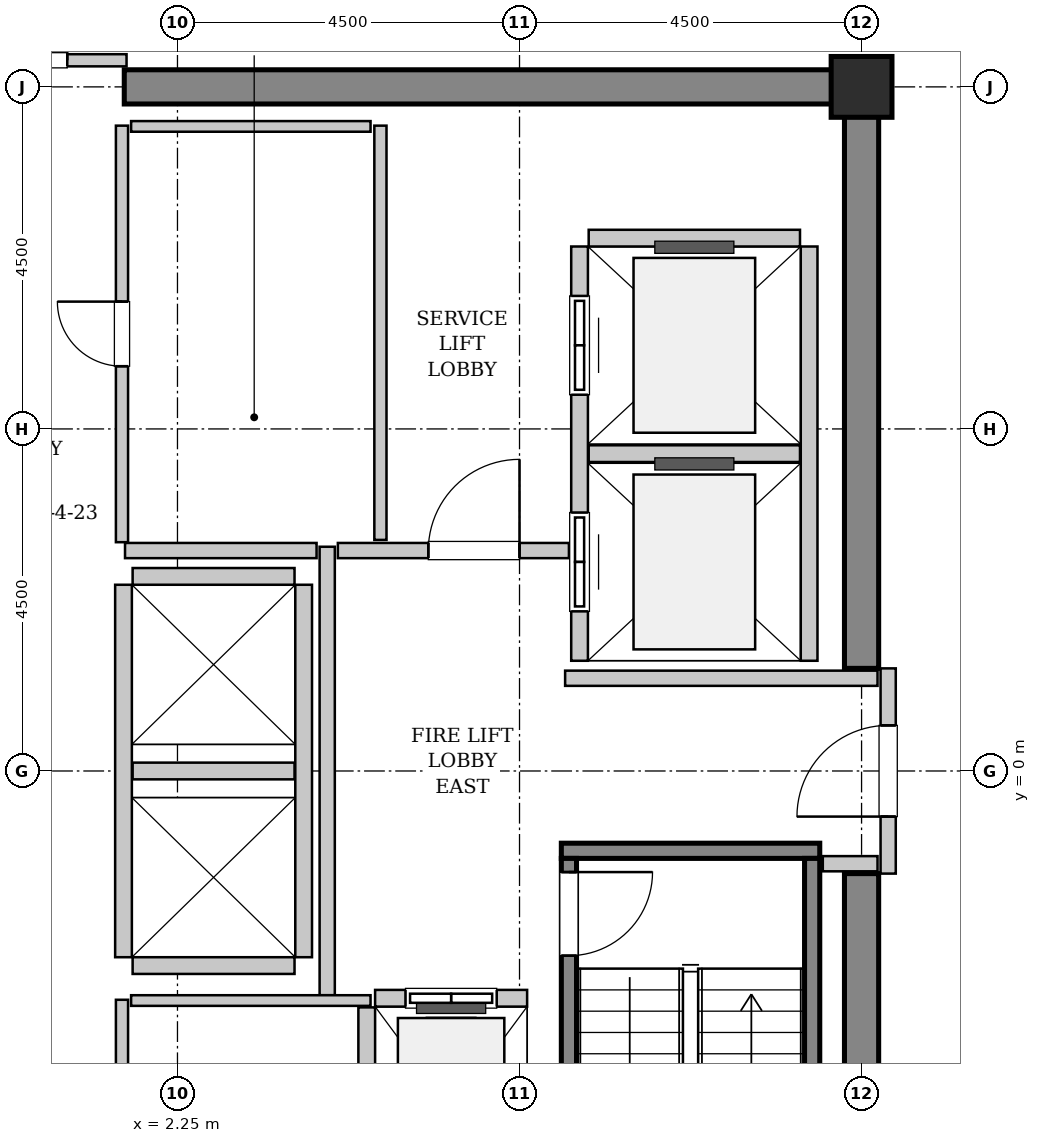
"""IFC4 building model, lengths in metres.
Left out: names, types, materials, properties, quantities, classifications, styles, units other than length and angle.
Written with IfcOpenShell. Run it as: python <this file> out.ifc"""

import sys

from ifc_helpers import new_model, si_unit, direction, frame, frame_2d, origin, origin_2d, place, context, subcontext, project, spatial, rectangle, hollow_rectangle, extrude, source, transform, mapped, element, fill, save


model = new_model("IFC4")
c1 = context("Model", 3, precision=1e-05, world=origin(), true_north=direction((0.0, 1.0)))
c2 = subcontext(c1, "Body", "Model", "MODEL_VIEW")
j1 = project(units=[si_unit("LENGTHUNIT", "METRE"), si_unit("PLANEANGLEUNIT", "RADIAN")], contexts=[c1])
p1 = place(None, origin())
s1 = spatial("IfcSite", under=j1, at=p1, CompositionType="ELEMENT")
p2 = place(p1, origin())
s2 = spatial("IfcBuilding", under=s1, at=p2, CompositionType="ELEMENT")
p3 = place(p2, frame((0.0, 0.0, 272.2)))
s3 = spatial("IfcBuildingStorey", under=s2, at=p3, CompositionType="ELEMENT", Elevation=272.2)
m1 = source(origin(), c2, "Body", "SweptSolid", [
    extrude(rectangle(XDim=9.925, YDim=0.45, at=frame_2d((4.962, 0.0))), origin(), (0.0, 0.0, 1.0), 3.8),
])
p4 = place(p3, frame((1.55, 9.0, 0.0), z_axis=(0.0, 0.0, 1.0), x_axis=(1.0, 0.0, 0.0)))
e1 = element("IfcWall", 1, at=p4, inside=s3, PredefinedType="SHEAR", context=c2, shape_type="MappedRepresentation", body=[
    mapped(m1, transform((0.0, 0.0, 0.0), x_axis=(1.0, 0.0, 0.0), y_axis=(0.0, 1.0, 0.0), z_axis=(0.0, 0.0, 1.0), scale=1.0)),
])
m2 = source(origin(), c2, "Body", "SweptSolid", [
    extrude(rectangle(XDim=7.425, YDim=0.45, at=frame_2d((3.712, 0.0))), origin(), (0.0, 0.0, 1.0), 3.8),
])
for number, where, z_axis, x_axis in (
    (2, (11.25, -8.775, 0.0), (0.0, 0.0, 1.0), (0.0, 1.0, 0.0)),
    (3, (11.25, 1.35, 0.0), (0.0, 0.0, 1.0), (0.0, 1.0, 0.0)),
):
    element("IfcWall", number, at=place(p3, frame(where, z_axis=z_axis, x_axis=x_axis)), inside=s3, PredefinedType="SHEAR", context=c2, shape_type="MappedRepresentation", body=[
        mapped(m2, transform((0.0, 0.0, 0.0), x_axis=(1.0, 0.0, 0.0), y_axis=(0.0, 1.0, 0.0), z_axis=(0.0, 0.0, 1.0), scale=1.0)),
    ])
m3 = source(origin(), c2, "Body", "SweptSolid", [
    extrude(hollow_rectangle(XDim=0.8, YDim=0.8, WallThickness=0.04, InnerFilletRadius=0.04, OuterFilletRadius=0.08, at=origin_2d()), origin(), (0.0, 0.0, 1.0), 3.8),
])
p5 = place(p3, frame((11.25, 9.0, 0.0), z_axis=(0.0, 0.0, 1.0), x_axis=(1.0, 0.0, 0.0)))
e4 = element("IfcColumn", 4, at=p5, inside=s3, PredefinedType="COLUMN", context=c2, shape_type="MappedRepresentation", body=[
    mapped(m3, transform((0.0, 0.0, 0.0), x_axis=(1.0, 0.0, 0.0), y_axis=(0.0, 1.0, 0.0), z_axis=(0.0, 0.0, 1.0), scale=1.0)),
])
m4 = source(origin(), c2, "Body", "SweptSolid", [
    extrude(rectangle(XDim=3.4, YDim=0.2, at=frame_2d((1.7, 0.0))), origin(), (0.0, 0.0, 1.0), 3.8),
])
p6 = place(p3, frame((7.3, -1.05, 0.0), z_axis=(0.0, 0.0, 1.0), x_axis=(1.0, 0.0, 0.0)))
e5 = element("IfcWall", 5, at=p6, inside=s3, PredefinedType="SOLIDWALL", context=c2, shape_type="MappedRepresentation", body=[
    mapped(m4, transform((0.0, 0.0, 0.0), x_axis=(1.0, 0.0, 0.0), y_axis=(0.0, 1.0, 0.0), z_axis=(0.0, 0.0, 1.0), scale=1.0)),
])
m5 = source(origin(), c2, "Body", "SweptSolid", [
    extrude(rectangle(XDim=7.1, YDim=0.2, at=frame_2d((3.55, 0.0))), origin(), (0.0, 0.0, 1.0), 3.8),
])
p7 = place(p3, frame((7.4, -1.15, 0.0), z_axis=(0.0, 0.0, 1.0), x_axis=(0.0, -1.0, 0.0)))
e6 = element("IfcWall", 6, at=p7, inside=s3, PredefinedType="SOLIDWALL", context=c2, shape_type="MappedRepresentation", body=[
    mapped(m5, transform((0.0, 0.0, 0.0), x_axis=(1.0, 0.0, 0.0), y_axis=(0.0, 1.0, 0.0), z_axis=(0.0, 0.0, 1.0), scale=1.0)),
])
p8 = place(p7, frame((0.18, 0.0, 0.0)))
e7 = element("IfcOpeningElement", 7, at=p8, cuts=e6, PredefinedType="OPENING", context=c2, shape_type="SweptSolid", body=[
    extrude(rectangle(XDim=1.1, YDim=2.15, at=frame_2d((0.55, 1.075))), frame((0.0, 0.11, 0.0), z_axis=(0.0, -1.0, 0.0), x_axis=(1.0, 0.0, 0.0)), (0.0, 0.0, 1.0), 0.22),
])
p9 = place(p3, frame((10.6, -1.15, 0.0), z_axis=(0.0, 0.0, 1.0), x_axis=(0.0, -1.0, 0.0)))
e8 = element("IfcWall", 8, at=p9, inside=s3, PredefinedType="SOLIDWALL", context=c2, shape_type="MappedRepresentation", body=[
    mapped(m5, transform((0.0, 0.0, 0.0), x_axis=(1.0, 0.0, 0.0), y_axis=(0.0, 1.0, 0.0), z_axis=(0.0, 0.0, 1.0), scale=1.0)),
])
m6 = source(origin(), c2, "Body", "SweptSolid", [
    extrude(rectangle(XDim=2.0, YDim=0.22, at=frame_2d((1.0, 0.0))), origin(), (0.0, 0.0, 1.0), 3.535),
])
p10 = place(p3, frame((6.85, -2.99, 0.0), z_axis=(0.0, 0.0, 1.0), x_axis=(-1.0, 0.0, 0.0)))
e9 = element("IfcWall", 9, at=p10, inside=s3, PredefinedType="SOLIDWALL", context=c2, shape_type="MappedRepresentation", body=[
    mapped(m6, transform((0.0, 0.0, 0.0), x_axis=(1.0, 0.0, 0.0), y_axis=(0.0, 1.0, 0.0), z_axis=(0.0, 0.0, 1.0), scale=1.0)),
])
p11 = place(p10, frame((0.4, 0.0, 0.0)))
e10 = element("IfcOpeningElement", 10, at=p11, cuts=e9, PredefinedType="OPENING", context=c2, shape_type="SweptSolid", body=[
    extrude(rectangle(XDim=1.2, YDim=2.2, at=frame_2d((0.6, 1.1))), frame((0.0, 0.12, 0.0), z_axis=(0.0, -1.0, 0.0), x_axis=(1.0, 0.0, 0.0)), (0.0, 0.0, 1.0), 0.24),
])
m7 = source(origin(), c2, "Body", "SweptSolid", [
    extrude(rectangle(XDim=2.68, YDim=0.22, at=frame_2d((1.34, 0.0))), origin(), (0.0, 0.0, 1.0), 3.535),
])
p12 = place(p3, frame((4.74, -3.11, 0.0), z_axis=(0.0, 0.0, 1.0), x_axis=(0.0, -1.0, 0.0)))
e11 = element("IfcWall", 11, at=p12, inside=s3, PredefinedType="SOLIDWALL", context=c2, shape_type="MappedRepresentation", body=[
    mapped(m7, transform((0.0, 0.0, 0.0), x_axis=(1.0, 0.0, 0.0), y_axis=(0.0, 1.0, 0.0), z_axis=(0.0, 0.0, 1.0), scale=1.0)),
])
m8 = source(origin(), c2, "Body", "SweptSolid", [
    extrude(rectangle(XDim=5.45, YDim=0.22, at=frame_2d((2.725, 0.0))), origin(), (0.0, 0.0, 1.0), 3.535),
])
p13 = place(p3, frame((7.54, 6.9, 0.0), z_axis=(0.0, 0.0, 1.0), x_axis=(0.0, -1.0, 0.0)))
e12 = element("IfcWall", 12, at=p13, inside=s3, PredefinedType="SOLIDWALL", context=c2, shape_type="MappedRepresentation", body=[
    mapped(m8, transform((0.0, 0.0, 0.0), x_axis=(1.0, 0.0, 0.0), y_axis=(0.0, 1.0, 0.0), z_axis=(0.0, 0.0, 1.0), scale=1.0)),
])
p14 = place(p13, frame((3.5, 0.0, 0.0)))
e13 = element("IfcOpeningElement", 13, at=p14, cuts=e12, PredefinedType="OPENING", context=c2, shape_type="SweptSolid", body=[
    extrude(rectangle(XDim=1.3, YDim=2.3, at=frame_2d((0.65, 1.15))), frame((0.0, 0.12, 0.0), z_axis=(0.0, -1.0, 0.0), x_axis=(1.0, 0.0, 0.0)), (0.0, 0.0, 1.0), 0.24),
])
p15 = place(p13, frame((0.65, 0.0, 0.0)))
e14 = element("IfcOpeningElement", 14, at=p15, cuts=e12, PredefinedType="OPENING", context=c2, shape_type="SweptSolid", body=[
    extrude(rectangle(XDim=1.3, YDim=2.3, at=frame_2d((0.65, 1.15))), frame((0.0, 0.12, 0.0), z_axis=(0.0, -1.0, 0.0), x_axis=(1.0, 0.0, 0.0)), (0.0, 0.0, 1.0), 0.24),
])
p16 = place(p3, frame((10.56, 1.45, 0.0), z_axis=(0.0, 0.0, 1.0), x_axis=(0.0, 1.0, 0.0)))
e15 = element("IfcWall", 15, at=p16, inside=s3, PredefinedType="SOLIDWALL", context=c2, shape_type="MappedRepresentation", body=[
    mapped(m8, transform((0.0, 0.0, 0.0), x_axis=(1.0, 0.0, 0.0), y_axis=(0.0, 1.0, 0.0), z_axis=(0.0, 0.0, 1.0), scale=1.0)),
])
m9 = source(origin(), c2, "Body", "SweptSolid", [
    extrude(rectangle(XDim=2.78, YDim=0.22, at=frame_2d((1.39, 0.0))), origin(), (0.0, 0.0, 1.0), 3.535),
])
for number, where, z_axis, x_axis in (
    (16, (7.66, 4.175, 0.0), (0.0, 0.0, 1.0), (1.0, 0.0, 0.0)),
    (17, (10.44, 7.01, 0.0), (0.0, 0.0, 1.0), (-1.0, 0.0, 0.0)),
):
    element("IfcWall", number, at=place(p3, frame(where, z_axis=z_axis, x_axis=x_axis)), inside=s3, PredefinedType="SOLIDWALL", context=c2, shape_type="MappedRepresentation", body=[
        mapped(m9, transform((0.0, 0.0, 0.0), x_axis=(1.0, 0.0, 0.0), y_axis=(0.0, 1.0, 0.0), z_axis=(0.0, 0.0, 1.0), scale=1.0)),
    ])
m10 = source(origin(), c2, "Body", "SweptSolid", [
    extrude(rectangle(XDim=4.9, YDim=0.22, at=frame_2d((2.45, 0.0))), origin(), (0.0, 0.0, 1.0), 3.535),
])
for number, where, z_axis, x_axis in (
    (18, (1.54, 2.45, 0.0), (0.0, 0.0, 1.0), (0.0, -1.0, 0.0)),
    (19, (3.91, -2.45, 0.0), (0.0, 0.0, 1.0), (0.0, 1.0, 0.0)),
):
    element("IfcWall", number, at=place(p3, frame(where, z_axis=z_axis, x_axis=x_axis)), inside=s3, PredefinedType="SOLIDWALL", context=c2, shape_type="MappedRepresentation", body=[
        mapped(m10, transform((0.0, 0.0, 0.0), x_axis=(1.0, 0.0, 0.0), y_axis=(0.0, 1.0, 0.0), z_axis=(0.0, 0.0, 1.0), scale=1.0)),
    ])
m11 = source(origin(), c2, "Body", "SweptSolid", [
    extrude(rectangle(XDim=2.13, YDim=0.22, at=frame_2d((1.065, 0.0))), origin(), (0.0, 0.0, 1.0), 3.535),
])
for number, where, z_axis, x_axis in (
    (20, (1.66, -2.56, 0.0), (0.0, 0.0, 1.0), (1.0, 0.0, 0.0)),
    (21, (1.66, 0.0, 0.0), (0.0, 0.0, 1.0), (1.0, 0.0, 0.0)),
    (22, (3.79, 2.56, 0.0), (0.0, 0.0, 1.0), (-1.0, 0.0, 0.0)),
):
    element("IfcWall", number, at=place(p3, frame(where, z_axis=z_axis, x_axis=x_axis)), inside=s3, PredefinedType="SOLIDWALL", context=c2, shape_type="MappedRepresentation", body=[
        mapped(m11, transform((0.0, 0.0, 0.0), x_axis=(1.0, 0.0, 0.0), y_axis=(0.0, 1.0, 0.0), z_axis=(0.0, 0.0, 1.0), scale=1.0)),
    ])
m12 = source(origin(), c2, "Body", "SweptSolid", [
    extrude(rectangle(XDim=2.7, YDim=0.2, at=frame_2d((1.35, 0.0))), origin(), (0.0, 0.0, 1.0), 2.625),
])
p17 = place(p3, frame((11.6, -1.35, 0.0), z_axis=(0.0, 0.0, 1.0), x_axis=(0.0, 1.0, 0.0)))
e23 = element("IfcWall", 23, at=p17, inside=s3, PredefinedType="PARTITIONING", context=c2, shape_type="MappedRepresentation", body=[
    mapped(m12, transform((0.0, 0.0, 0.0), x_axis=(1.0, 0.0, 0.0), y_axis=(0.0, 1.0, 0.0), z_axis=(0.0, 0.0, 1.0), scale=1.0)),
])
p18 = place(p17, frame((0.75, 0.0, 0.0)))
e24 = element("IfcOpeningElement", 24, at=p18, cuts=e23, PredefinedType="OPENING", context=c2, shape_type="SweptSolid", body=[
    extrude(rectangle(XDim=1.2, YDim=2.15, at=frame_2d((0.6, 1.075))), frame((0.0, 0.11, 0.0), z_axis=(0.0, -1.0, 0.0), x_axis=(1.0, 0.0, 0.0)), (0.0, 0.0, 1.0), 0.22),
])
m13 = source(origin(), c2, "Body", "SweptSolid", [
    extrude(rectangle(XDim=5.9, YDim=0.2, at=frame_2d((2.95, 0.0))), origin(), (0.0, 0.0, 1.0), 3.535),
])
p19 = place(p3, frame((4.22, -2.95, 0.0), z_axis=(0.0, 0.0, 1.0), x_axis=(0.0, 1.0, 0.0)))
e25 = element("IfcWall", 25, at=p19, inside=s3, PredefinedType="PARTITIONING", context=c2, shape_type="MappedRepresentation", body=[
    mapped(m13, transform((0.0, 0.0, 0.0), x_axis=(1.0, 0.0, 0.0), y_axis=(0.0, 1.0, 0.0), z_axis=(0.0, 0.0, 1.0), scale=1.0)),
])
m14 = source(origin(), c2, "Body", "SweptSolid", [
    extrude(rectangle(XDim=2.52, YDim=0.2, at=frame_2d((1.26, 0.0))), origin(), (0.0, 0.0, 1.0), 3.535),
])
p20 = place(p3, frame((1.56, 2.9, 0.0), z_axis=(0.0, 0.0, 1.0), x_axis=(1.0, 0.0, 0.0)))
e26 = element("IfcWall", 26, at=p20, inside=s3, PredefinedType="PARTITIONING", context=c2, shape_type="MappedRepresentation", body=[
    mapped(m14, transform((0.0, 0.0, 0.0), x_axis=(1.0, 0.0, 0.0), y_axis=(0.0, 1.0, 0.0), z_axis=(0.0, 0.0, 1.0), scale=1.0)),
])
m15 = source(origin(), c2, "Body", "SweptSolid", [
    extrude(rectangle(XDim=3.04, YDim=0.2, at=frame_2d((1.52, 0.0))), origin(), (0.0, 0.0, 1.0), 3.535),
])
p21 = place(p3, frame((4.36, 2.9, 0.0), z_axis=(0.0, 0.0, 1.0), x_axis=(1.0, 0.0, 0.0)))
e27 = element("IfcWall", 27, at=p21, inside=s3, PredefinedType="PARTITIONING", context=c2, shape_type="MappedRepresentation", body=[
    mapped(m15, transform((0.0, 0.0, 0.0), x_axis=(1.0, 0.0, 0.0), y_axis=(0.0, 1.0, 0.0), z_axis=(0.0, 0.0, 1.0), scale=1.0)),
])
p22 = place(p21, frame((1.19, 0.0, 0.0)))
e28 = element("IfcOpeningElement", 28, at=p22, cuts=e27, PredefinedType="OPENING", context=c2, shape_type="SweptSolid", body=[
    extrude(rectangle(XDim=1.2, YDim=2.15, at=frame_2d((0.6, 1.075))), frame((0.0, 0.11, 0.0), z_axis=(0.0, -1.0, 0.0), x_axis=(1.0, 0.0, 0.0)), (0.0, 0.0, 1.0), 0.22),
])
m16 = source(origin(), c2, "Body", "SweptSolid", [
    extrude(rectangle(XDim=4.11, YDim=0.2, at=frame_2d((2.055, 0.0))), origin(), (0.0, 0.0, 1.0), 3.535),
])
p23 = place(p3, frame((7.35, 1.22, 0.0), z_axis=(0.0, 0.0, 1.0), x_axis=(1.0, 0.0, 0.0)))
e29 = element("IfcWall", 29, at=p23, inside=s3, PredefinedType="PARTITIONING", context=c2, shape_type="MappedRepresentation", body=[
    mapped(m16, transform((0.0, 0.0, 0.0), x_axis=(1.0, 0.0, 0.0), y_axis=(0.0, 1.0, 0.0), z_axis=(0.0, 0.0, 1.0), scale=1.0)),
])
m17 = source(origin(), c2, "Body", "SweptSolid", [
    extrude(rectangle(XDim=0.72, YDim=0.2, at=frame_2d((0.36, 0.0))), origin(), (0.0, 0.0, 1.0), 3.535),
])
p24 = place(p3, frame((10.74, -1.22, 0.0), z_axis=(0.0, 0.0, 1.0), x_axis=(1.0, 0.0, 0.0)))
e30 = element("IfcWall", 30, at=p24, inside=s3, PredefinedType="PARTITIONING", context=c2, shape_type="MappedRepresentation", body=[
    mapped(m17, transform((0.0, 0.0, 0.0), x_axis=(1.0, 0.0, 0.0), y_axis=(0.0, 1.0, 0.0), z_axis=(0.0, 0.0, 1.0), scale=1.0)),
])
m18 = source(origin(), c2, "Body", "SweptSolid", [
    extrude(rectangle(XDim=3.16, YDim=0.16, at=frame_2d((1.58, 0.0))), origin(), (0.0, 0.0, 1.0), 2.625),
])
p25 = place(p3, frame((-1.58, 9.35, 0.0), z_axis=(0.0, 0.0, 1.0), x_axis=(1.0, 0.0, 0.0)))
e31 = element("IfcWall", 31, at=p25, inside=s3, PredefinedType="PARTITIONING", context=c2, shape_type="MappedRepresentation", body=[
    mapped(m18, transform((0.0, 0.0, 0.0), x_axis=(1.0, 0.0, 0.0), y_axis=(0.0, 1.0, 0.0), z_axis=(0.0, 0.0, 1.0), scale=1.0)),
])
p26 = place(p25, frame((0.78, 0.0, 0.0)))
e32 = element("IfcOpeningElement", 32, at=p26, cuts=e31, PredefinedType="OPENING", context=c2, shape_type="SweptSolid", body=[
    extrude(rectangle(XDim=1.6, YDim=2.3, at=frame_2d((0.8, 1.15))), frame((0.0, 0.09, 0.0), z_axis=(0.0, -1.0, 0.0), x_axis=(1.0, 0.0, 0.0)), (0.0, 0.0, 1.0), 0.18),
])
m19 = source(origin(), c2, "Body", "SweptSolid", [
    extrude(rectangle(XDim=5.45, YDim=0.16, at=frame_2d((2.725, 0.0))), origin(), (0.0, 0.0, 1.0), 3.535),
])
p27 = place(p3, frame((4.92, 3.04, 0.0), z_axis=(0.0, 0.0, 1.0), x_axis=(0.0, 1.0, 0.0)))
e33 = element("IfcWall", 33, at=p27, inside=s3, PredefinedType="PARTITIONING", context=c2, shape_type="MappedRepresentation", body=[
    mapped(m19, transform((0.0, 0.0, 0.0), x_axis=(1.0, 0.0, 0.0), y_axis=(0.0, 1.0, 0.0), z_axis=(0.0, 0.0, 1.0), scale=1.0)),
])
m20 = source(origin(), c2, "Body", "SweptSolid", [
    extrude(rectangle(XDim=5.48, YDim=0.16, at=frame_2d((2.74, 0.0))), origin(), (0.0, 0.0, 1.0), 3.535),
])
p28 = place(p3, frame((1.52, 3.01, 0.0), z_axis=(0.0, 0.0, 1.0), x_axis=(0.0, 1.0, 0.0)))
e34 = element("IfcWall", 34, at=p28, inside=s3, PredefinedType="PARTITIONING", context=c2, shape_type="MappedRepresentation", body=[
    mapped(m20, transform((0.0, 0.0, 0.0), x_axis=(1.0, 0.0, 0.0), y_axis=(0.0, 1.0, 0.0), z_axis=(0.0, 0.0, 1.0), scale=1.0)),
])
p29 = place(p28, frame((2.315, 0.0, 0.0)))
e35 = element("IfcOpeningElement", 35, at=p29, cuts=e34, PredefinedType="OPENING", context=c2, shape_type="SweptSolid", body=[
    extrude(rectangle(XDim=0.85, YDim=2.1, at=frame_2d((0.425, 1.05))), frame((0.0, 0.09, 0.0), z_axis=(0.0, -1.0, 0.0), x_axis=(1.0, 0.0, 0.0)), (0.0, 0.0, 1.0), 0.18),
])
m21 = source(origin(), c2, "Body", "SweptSolid", [
    extrude(rectangle(XDim=3.15, YDim=0.14, at=frame_2d((1.575, 0.0))), origin(), (0.0, 0.0, 1.0), 3.535),
])
p30 = place(p3, frame((1.64, 8.48, 0.0), z_axis=(0.0, 0.0, 1.0), x_axis=(1.0, 0.0, 0.0)))
e36 = element("IfcWall", 36, at=p30, inside=s3, PredefinedType="PARTITIONING", context=c2, shape_type="MappedRepresentation", body=[
    mapped(m21, transform((0.0, 0.0, 0.0), x_axis=(1.0, 0.0, 0.0), y_axis=(0.0, 1.0, 0.0), z_axis=(0.0, 0.0, 1.0), scale=1.0)),
])
p31 = place(p3, frame((1.52, -8.49, 0.0), z_axis=(0.0, 0.0, 1.0), x_axis=(0.0, 1.0, 0.0)))
e37 = element("IfcWall", 37, at=p31, inside=s3, PredefinedType="PARTITIONING", context=c2, shape_type="MappedRepresentation", body=[
    mapped(m20, transform((0.0, 0.0, 0.0), x_axis=(1.0, 0.0, 0.0), y_axis=(0.0, 1.0, 0.0), z_axis=(0.0, 0.0, 1.0), scale=1.0)),
])
p32 = place(p31, frame((2.315, 0.0, 0.0)))
e38 = element("IfcOpeningElement", 38, at=p32, cuts=e37, PredefinedType="OPENING", context=c2, shape_type="SweptSolid", body=[
    extrude(rectangle(XDim=0.85, YDim=2.1, at=frame_2d((0.425, 1.05))), frame((0.0, 0.09, 0.0), z_axis=(0.0, -1.0, 0.0), x_axis=(1.0, 0.0, 0.0)), (0.0, 0.0, 1.0), 0.18),
])
p33 = place(p3, frame((1.64, -3.02, 0.0), z_axis=(0.0, 0.0, 1.0), x_axis=(1.0, 0.0, 0.0)))
e39 = element("IfcWall", 39, at=p33, inside=s3, PredefinedType="PARTITIONING", context=c2, shape_type="MappedRepresentation", body=[
    mapped(m21, transform((0.0, 0.0, 0.0), x_axis=(1.0, 0.0, 0.0), y_axis=(0.0, 1.0, 0.0), z_axis=(0.0, 0.0, 1.0), scale=1.0)),
])
m22 = source(origin(), c2, "Body", "SweptSolid", [
    extrude(rectangle(XDim=1.1, YDim=2.15, at=frame_2d((0.55, 1.075))), frame((0.0, 0.025, 0.0), z_axis=(0.0, -1.0, 0.0), x_axis=(1.0, 0.0, 0.0)), (0.0, 0.0, 1.0), 0.05),
])
p34 = place(p8, origin())
e40 = element("IfcDoor", 40, at=p34, inside=s3, OperationType="SINGLE_SWING_LEFT", PredefinedType="DOOR", context=c2, shape_type="MappedRepresentation", body=[
    mapped(m22, transform((0.0, 0.0, 0.0), x_axis=(1.0, 0.0, 0.0), y_axis=(0.0, 1.0, 0.0), z_axis=(0.0, 0.0, 1.0), scale=1.0)),
])
fill(e7, e40)
m23 = source(origin(), c2, "Body", "SweptSolid", [
    extrude(rectangle(XDim=1.2, YDim=2.2, at=frame_2d((0.6, 1.1))), frame((0.0, 0.025, 0.0), z_axis=(0.0, -1.0, 0.0), x_axis=(1.0, 0.0, 0.0)), (0.0, 0.0, 1.0), 0.05),
])
p35 = place(p11, origin())
e41 = element("IfcDoor", 41, at=p35, inside=s3, OperationType="SLIDING_TO_LEFT", PredefinedType="DOOR", context=c2, shape_type="MappedRepresentation", body=[
    mapped(m23, transform((0.0, 0.0, 0.0), x_axis=(1.0, 0.0, 0.0), y_axis=(0.0, 1.0, 0.0), z_axis=(0.0, 0.0, 1.0), scale=1.0)),
])
fill(e10, e41)
m24 = source(origin(), c2, "Body", "SweptSolid", [
    extrude(rectangle(XDim=1.3, YDim=2.3, at=frame_2d((0.65, 1.15))), frame((0.0, 0.025, 0.0), z_axis=(0.0, -1.0, 0.0), x_axis=(1.0, 0.0, 0.0)), (0.0, 0.0, 1.0), 0.05),
])
p36 = place(p14, origin())
e42 = element("IfcDoor", 42, at=p36, inside=s3, OperationType="SLIDING_TO_RIGHT", PredefinedType="DOOR", context=c2, shape_type="MappedRepresentation", body=[
    mapped(m24, transform((0.0, 0.0, 0.0), x_axis=(1.0, 0.0, 0.0), y_axis=(0.0, 1.0, 0.0), z_axis=(0.0, 0.0, 1.0), scale=1.0)),
])
fill(e13, e42)
p37 = place(p15, origin())
e43 = element("IfcDoor", 43, at=p37, inside=s3, OperationType="SLIDING_TO_RIGHT", PredefinedType="DOOR", context=c2, shape_type="MappedRepresentation", body=[
    mapped(m24, transform((0.0, 0.0, 0.0), x_axis=(1.0, 0.0, 0.0), y_axis=(0.0, 1.0, 0.0), z_axis=(0.0, 0.0, 1.0), scale=1.0)),
])
fill(e14, e43)
m25 = source(origin(), c2, "Body", "SweptSolid", [
    extrude(rectangle(XDim=1.2, YDim=2.15, at=frame_2d((0.6, 1.075))), frame((0.0, 0.025, 0.0), z_axis=(0.0, -1.0, 0.0), x_axis=(1.0, 0.0, 0.0)), (0.0, 0.0, 1.0), 0.05),
])
p38 = place(p18, origin())
e44 = element("IfcDoor", 44, at=p38, inside=s3, OperationType="SINGLE_SWING_LEFT", PredefinedType="DOOR", context=c2, shape_type="MappedRepresentation", body=[
    mapped(m25, transform((0.0, 0.0, 0.0), x_axis=(1.0, 0.0, 0.0), y_axis=(0.0, 1.0, 0.0), z_axis=(0.0, 0.0, 1.0), scale=1.0)),
])
fill(e24, e44)
p39 = place(p22, origin())
e45 = element("IfcDoor", 45, at=p39, inside=s3, OperationType="SINGLE_SWING_RIGHT", PredefinedType="DOOR", context=c2, shape_type="MappedRepresentation", body=[
    mapped(m25, transform((0.0, 0.0, 0.0), x_axis=(1.0, 0.0, 0.0), y_axis=(0.0, 1.0, 0.0), z_axis=(0.0, 0.0, 1.0), scale=1.0)),
])
fill(e28, e45)
m26 = source(origin(), c2, "Body", "SweptSolid", [
    extrude(rectangle(XDim=1.6, YDim=2.3, at=frame_2d((0.8, 1.15))), frame((0.0, 0.025, 0.0), z_axis=(0.0, -1.0, 0.0), x_axis=(1.0, 0.0, 0.0)), (0.0, 0.0, 1.0), 0.05),
])
p40 = place(p26, origin())
e46 = element("IfcDoor", 46, at=p40, inside=s3, OperationType="DOUBLE_DOOR_SINGLE_SWING", PredefinedType="DOOR", context=c2, shape_type="MappedRepresentation", body=[
    mapped(m26, transform((0.0, 0.0, 0.0), x_axis=(1.0, 0.0, 0.0), y_axis=(0.0, 1.0, 0.0), z_axis=(0.0, 0.0, 1.0), scale=1.0)),
])
fill(e32, e46)
m27 = source(origin(), c2, "Body", "SweptSolid", [
    extrude(rectangle(XDim=0.85, YDim=2.1, at=frame_2d((0.425, 1.05))), frame((0.0, 0.025, 0.0), z_axis=(0.0, -1.0, 0.0), x_axis=(1.0, 0.0, 0.0)), (0.0, 0.0, 1.0), 0.05),
])
p41 = place(p29, origin())
e47 = element("IfcDoor", 47, at=p41, inside=s3, OperationType="SINGLE_SWING_RIGHT", PredefinedType="DOOR", context=c2, shape_type="MappedRepresentation", body=[
    mapped(m27, transform((0.0, 0.0, 0.0), x_axis=(1.0, 0.0, 0.0), y_axis=(0.0, 1.0, 0.0), z_axis=(0.0, 0.0, 1.0), scale=1.0)),
])
fill(e35, e47)
save(model, sys.argv[1])
